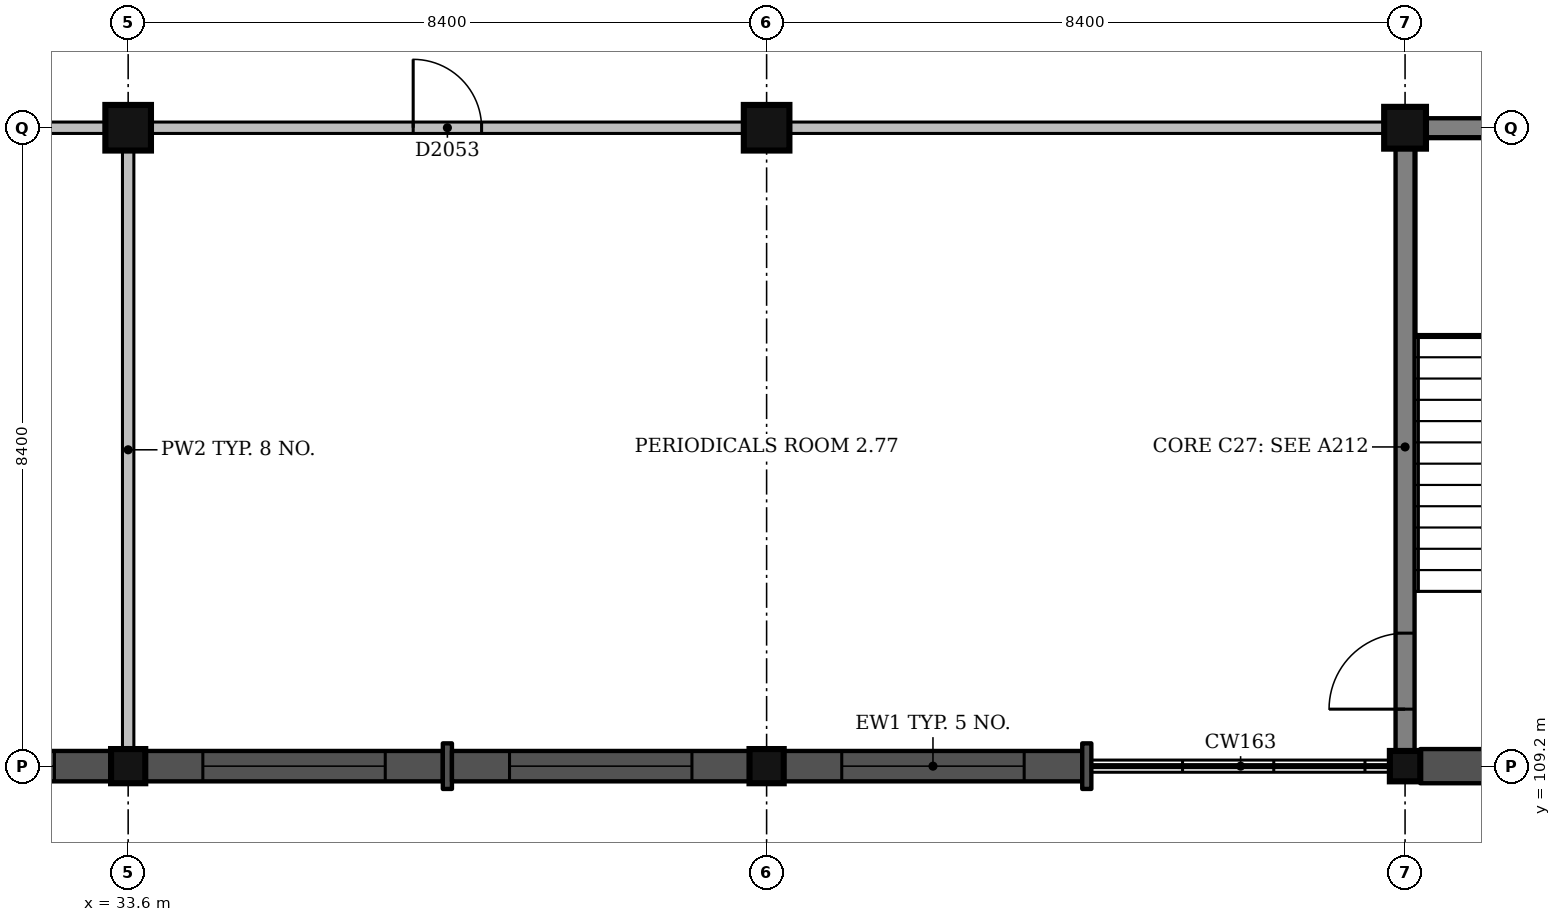
"""IFC4 building model, lengths in metres.
Left out: names, types, materials, properties, quantities, classifications, styles, units other than length and angle.
Written with IfcOpenShell. Run it as: python <this file> out.ifc"""

import sys

from ifc_helpers import new_model, si_unit, direction, frame, frame_2d, origin, origin_2d, place, context, subcontext, project, spatial, rectangle, extrude, element, fill, save


model = new_model("IFC4")
c1 = context("Model", 3, precision=1e-05, world=origin(), true_north=direction((0.0, 1.0)))
c2 = subcontext(c1, "Body", "Model", "MODEL_VIEW")
j1 = project(units=[si_unit("LENGTHUNIT", "METRE"), si_unit("PLANEANGLEUNIT", "RADIAN")], contexts=[c1])
p1 = place(None, origin())
s1 = spatial("IfcSite", under=j1, at=p1, CompositionType="ELEMENT")
p2 = place(p1, origin())
s2 = spatial("IfcBuilding", under=s1, at=p2, CompositionType="ELEMENT")
p3 = place(p2, frame((0.0, 0.0, 9.0)))
s3 = spatial("IfcBuildingStorey", under=s2, at=p3, CompositionType="ELEMENT", Elevation=9.0)
p4 = place(p3, frame((33.6, 109.2, -0.25), z_axis=(0.0, 0.0, 1.0), x_axis=(1.0, 0.0, 0.0)))
e1 = element("IfcColumn", 1, at=p4, inside=s3, PredefinedType="COLUMN", context=c2, shape_type="SweptSolid", body=[
    extrude(rectangle(XDim=0.45, YDim=0.45, at=origin_2d()), origin(), (0.0, 0.0, 1.0), 4.75),
])
p5 = place(p3, frame((33.6, 117.6, -1.5), z_axis=(0.0, 0.0, 1.0), x_axis=(1.0, 0.0, 0.0)))
e2 = element("IfcColumn", 2, at=p5, inside=s3, PredefinedType="COLUMN", context=c2, shape_type="SweptSolid", body=[
    extrude(rectangle(XDim=0.6, YDim=0.6, at=origin_2d()), origin(), (0.0, 0.0, 1.0), 6.0),
])
p6 = place(p3, frame((42.0, 109.2, -0.25), z_axis=(0.0, 0.0, 1.0), x_axis=(1.0, 0.0, 0.0)))
e3 = element("IfcColumn", 3, at=p6, inside=s3, PredefinedType="COLUMN", context=c2, shape_type="SweptSolid", body=[
    extrude(rectangle(XDim=0.45, YDim=0.45, at=origin_2d()), origin(), (0.0, 0.0, 1.0), 4.75),
])
p7 = place(p3, frame((42.0, 117.6, -1.5), z_axis=(0.0, 0.0, 1.0), x_axis=(1.0, 0.0, 0.0)))
e4 = element("IfcColumn", 4, at=p7, inside=s3, PredefinedType="COLUMN", context=c2, shape_type="SweptSolid", body=[
    extrude(rectangle(XDim=0.6, YDim=0.6, at=origin_2d()), origin(), (0.0, 0.0, 1.0), 6.0),
])
p8 = place(p3, frame((50.4, 109.2, -0.25), z_axis=(0.0, 0.0, 1.0), x_axis=(1.0, 0.0, 0.0)))
e5 = element("IfcColumn", 5, at=p8, inside=s3, PredefinedType="COLUMN", context=c2, shape_type="SweptSolid", body=[
    extrude(rectangle(XDim=0.4, YDim=0.4, at=origin_2d()), origin(), (0.0, 0.0, 1.0), 4.75),
])
p9 = place(p3, frame((50.4, 117.6, -1.5), z_axis=(0.0, 0.0, 1.0), x_axis=(1.0, 0.0, 0.0)))
e6 = element("IfcColumn", 6, at=p9, inside=s3, PredefinedType="COLUMN", context=c2, shape_type="SweptSolid", body=[
    extrude(rectangle(XDim=0.55, YDim=0.55, at=origin_2d()), origin(), (0.0, 0.0, 1.0), 6.0),
])
p10 = place(p3, frame((50.675, 117.6, 0.0), z_axis=(0.0, 0.0, 1.0), x_axis=(1.0, 0.0, 0.0)))
e7 = element("IfcWall", 7, at=p10, inside=s3, PredefinedType="SHEAR", context=c2, shape_type="SweptSolid", body=[
    extrude(rectangle(XDim=5.45, YDim=0.25, at=frame_2d((2.725, 0.0))), origin(), (0.0, 0.0, 1.0), 4.5),
])
p11 = place(p3, frame((50.4, 109.4, 0.0), z_axis=(0.0, 0.0, 1.0), x_axis=(0.0, 1.0, 0.0)))
e8 = element("IfcWall", 8, at=p11, inside=s3, PredefinedType="SHEAR", context=c2, shape_type="SweptSolid", body=[
    extrude(rectangle(XDim=7.925, YDim=0.25, at=frame_2d((3.962, 0.0))), origin(), (0.0, 0.0, 1.0), 4.5),
])
p12 = place(p11, frame((0.55, 0.0, 0.0)))
e9 = element("IfcOpeningElement", 9, at=p12, cuts=e8, PredefinedType="OPENING", context=c2, shape_type="SweptSolid", body=[
    extrude(rectangle(XDim=1.0, YDim=2.1, at=frame_2d((0.5, 1.05))), frame((0.0, 0.135, 0.0), z_axis=(0.0, -1.0, 0.0), x_axis=(1.0, 0.0, 0.0)), (0.0, 0.0, 1.0), 0.27),
])
p13 = place(p3, frame((29.485, 109.2, 0.0), z_axis=(0.0, 0.0, 1.0), x_axis=(1.0, 0.0, 0.0)))
e10 = element("IfcWall", 10, at=p13, inside=s3, PredefinedType="SOLIDWALL", context=c2, shape_type="SweptSolid", body=[
    extrude(rectangle(XDim=3.89, YDim=0.4, at=frame_2d((1.945, 0.0))), origin(), (0.0, 0.0, 1.0), 4.2),
])
p14 = place(p13, frame((0.745, 0.0, 0.6)))
e11 = element("IfcOpeningElement", 11, at=p14, cuts=e10, PredefinedType="OPENING", context=c2, shape_type="SweptSolid", body=[
    extrude(rectangle(XDim=2.4, YDim=2.4, at=frame_2d((1.2, 1.2))), frame((0.0, 0.21, 0.0), z_axis=(0.0, -1.0, 0.0), x_axis=(1.0, 0.0, 0.0)), (0.0, 0.0, 1.0), 0.42),
])
p15 = place(p3, frame((33.825, 109.2, 0.0), z_axis=(0.0, 0.0, 1.0), x_axis=(1.0, 0.0, 0.0)))
e12 = element("IfcWall", 12, at=p15, inside=s3, PredefinedType="SOLIDWALL", context=c2, shape_type="SweptSolid", body=[
    extrude(rectangle(XDim=3.915, YDim=0.4, at=frame_2d((1.958, 0.0))), origin(), (0.0, 0.0, 1.0), 3.35),
])
p16 = place(p15, frame((0.758, 0.0, 0.6)))
e13 = element("IfcOpeningElement", 13, at=p16, cuts=e12, PredefinedType="OPENING", context=c2, shape_type="SweptSolid", body=[
    extrude(rectangle(XDim=2.4, YDim=2.4, at=frame_2d((1.2, 1.2))), frame((0.0, 0.21, 0.0), z_axis=(0.0, -1.0, 0.0), x_axis=(1.0, 0.0, 0.0)), (0.0, 0.0, 1.0), 0.42),
])
p17 = place(p3, frame((37.74, 109.2, 0.0), z_axis=(0.0, 0.0, 1.0), x_axis=(1.0, 0.0, 0.0)))
e14 = element("IfcWall", 14, at=p17, inside=s3, PredefinedType="SOLIDWALL", context=c2, shape_type="SweptSolid", body=[
    extrude(rectangle(XDim=0.12, YDim=0.6, at=frame_2d((0.06, 0.0))), origin(), (0.0, 0.0, 1.0), 3.35),
])
p18 = place(p3, frame((37.86, 109.2, 0.0), z_axis=(0.0, 0.0, 1.0), x_axis=(1.0, 0.0, 0.0)))
e15 = element("IfcWall", 15, at=p18, inside=s3, PredefinedType="SOLIDWALL", context=c2, shape_type="SweptSolid", body=[
    extrude(rectangle(XDim=3.915, YDim=0.4, at=frame_2d((1.958, 0.0))), origin(), (0.0, 0.0, 1.0), 3.35),
])
p19 = place(p18, frame((0.758, 0.0, 0.6)))
e16 = element("IfcOpeningElement", 16, at=p19, cuts=e15, PredefinedType="OPENING", context=c2, shape_type="SweptSolid", body=[
    extrude(rectangle(XDim=2.4, YDim=2.4, at=frame_2d((1.2, 1.2))), frame((0.0, 0.21, 0.0), z_axis=(0.0, -1.0, 0.0), x_axis=(1.0, 0.0, 0.0)), (0.0, 0.0, 1.0), 0.42),
])
p20 = place(p3, frame((42.225, 109.2, 0.0), z_axis=(0.0, 0.0, 1.0), x_axis=(1.0, 0.0, 0.0)))
e17 = element("IfcWall", 17, at=p20, inside=s3, PredefinedType="SOLIDWALL", context=c2, shape_type="SweptSolid", body=[
    extrude(rectangle(XDim=3.927, YDim=0.4, at=frame_2d((1.964, 0.0))), origin(), (0.0, 0.0, 1.0), 3.35),
])
p21 = place(p20, frame((0.764, 0.0, 0.6)))
e18 = element("IfcOpeningElement", 18, at=p21, cuts=e17, PredefinedType="OPENING", context=c2, shape_type="SweptSolid", body=[
    extrude(rectangle(XDim=2.4, YDim=2.4, at=frame_2d((1.2, 1.2))), frame((0.0, 0.21, 0.0), z_axis=(0.0, -1.0, 0.0), x_axis=(1.0, 0.0, 0.0)), (0.0, 0.0, 1.0), 0.42),
])
p22 = place(p3, frame((46.153, 109.2, 0.0), z_axis=(0.0, 0.0, 1.0), x_axis=(1.0, 0.0, 0.0)))
e19 = element("IfcWall", 19, at=p22, inside=s3, PredefinedType="SOLIDWALL", context=c2, shape_type="SweptSolid", body=[
    extrude(rectangle(XDim=0.12, YDim=0.6, at=frame_2d((0.06, 0.0))), origin(), (0.0, 0.0, 1.0), 3.35),
])
p23 = place(p3, frame((50.6, 109.2, 0.0), z_axis=(0.0, 0.0, 1.0), x_axis=(1.0, 0.0, 0.0)))
e20 = element("IfcWall", 20, at=p23, inside=s3, PredefinedType="SOLIDWALL", context=c2, shape_type="SweptSolid", body=[
    extrude(rectangle(XDim=3.94, YDim=0.45, at=frame_2d((1.97, 0.0))), origin(), (0.0, 0.0, 1.0), 3.35),
])
p24 = place(p3, frame((25.5, 117.6, 0.0), z_axis=(0.0, 0.0, 1.0), x_axis=(1.0, 0.0, 0.0)))
e21 = element("IfcWall", 21, at=p24, inside=s3, PredefinedType="PARTITIONING", context=c2, shape_type="SweptSolid", body=[
    extrude(rectangle(XDim=7.8, YDim=0.15, at=frame_2d((3.9, 0.0))), origin(), (0.0, 0.0, 1.0), 3.4),
])
p25 = place(p3, frame((33.9, 117.6, 0.0), z_axis=(0.0, 0.0, 1.0), x_axis=(1.0, 0.0, 0.0)))
e22 = element("IfcWall", 22, at=p25, inside=s3, PredefinedType="PARTITIONING", context=c2, shape_type="SweptSolid", body=[
    extrude(rectangle(XDim=7.8, YDim=0.15, at=frame_2d((3.9, 0.0))), origin(), (0.0, 0.0, 1.0), 3.4),
])
p26 = place(p25, frame((3.45, 0.0, 0.0)))
e23 = element("IfcOpeningElement", 23, at=p26, cuts=e22, PredefinedType="OPENING", context=c2, shape_type="SweptSolid", body=[
    extrude(rectangle(XDim=0.9, YDim=2.1, at=frame_2d((0.45, 1.05))), frame((0.0, 0.085, 0.0), z_axis=(0.0, -1.0, 0.0), x_axis=(1.0, 0.0, 0.0)), (0.0, 0.0, 1.0), 0.17),
])
p27 = place(p3, frame((42.3, 117.6, 0.0), z_axis=(0.0, 0.0, 1.0), x_axis=(1.0, 0.0, 0.0)))
e24 = element("IfcWall", 24, at=p27, inside=s3, PredefinedType="PARTITIONING", context=c2, shape_type="SweptSolid", body=[
    extrude(rectangle(XDim=7.825, YDim=0.15, at=frame_2d((3.913, 0.0))), origin(), (0.0, 0.0, 1.0), 3.4),
])
p28 = place(p3, frame((33.6, 109.425, 0.0), z_axis=(0.0, 0.0, 1.0), x_axis=(0.0, 1.0, 0.0)))
e25 = element("IfcWall", 25, at=p28, inside=s3, PredefinedType="PARTITIONING", context=c2, shape_type="SweptSolid", body=[
    extrude(rectangle(XDim=7.875, YDim=0.15, at=frame_2d((3.938, 0.0))), origin(), (0.0, 0.0, 1.0), 3.4),
])
p29 = place(p14, origin())
e26 = element("IfcWindow", 26, at=p29, inside=s3, PartitioningType="SINGLE_PANEL", PredefinedType="WINDOW", context=c2, shape_type="SweptSolid", body=[
    extrude(rectangle(XDim=2.4, YDim=2.4, at=frame_2d((1.2, 1.2))), frame((0.0, 0.16, 0.0), z_axis=(0.0, -1.0, 0.0), x_axis=(1.0, 0.0, 0.0)), (0.0, 0.0, 1.0), 0.06),
])
fill(e11, e26)
p30 = place(p16, origin())
e27 = element("IfcWindow", 27, at=p30, inside=s3, PartitioningType="SINGLE_PANEL", PredefinedType="WINDOW", context=c2, shape_type="SweptSolid", body=[
    extrude(rectangle(XDim=2.4, YDim=2.4, at=frame_2d((1.2, 1.2))), frame((0.0, 0.16, 0.0), z_axis=(0.0, -1.0, 0.0), x_axis=(1.0, 0.0, 0.0)), (0.0, 0.0, 1.0), 0.06),
])
fill(e13, e27)
p31 = place(p19, origin())
e28 = element("IfcWindow", 28, at=p31, inside=s3, PartitioningType="SINGLE_PANEL", PredefinedType="WINDOW", context=c2, shape_type="SweptSolid", body=[
    extrude(rectangle(XDim=2.4, YDim=2.4, at=frame_2d((1.2, 1.2))), frame((0.0, 0.16, 0.0), z_axis=(0.0, -1.0, 0.0), x_axis=(1.0, 0.0, 0.0)), (0.0, 0.0, 1.0), 0.06),
])
fill(e16, e28)
p32 = place(p21, origin())
e29 = element("IfcWindow", 29, at=p32, inside=s3, PartitioningType="SINGLE_PANEL", PredefinedType="WINDOW", context=c2, shape_type="SweptSolid", body=[
    extrude(rectangle(XDim=2.4, YDim=2.4, at=frame_2d((1.2, 1.2))), frame((0.0, 0.16, 0.0), z_axis=(0.0, -1.0, 0.0), x_axis=(1.0, 0.0, 0.0)), (0.0, 0.0, 1.0), 0.06),
])
fill(e18, e29)
p33 = place(p26, origin())
e30 = element("IfcDoor", 30, at=p33, inside=s3, OperationType="SINGLE_SWING_LEFT", PredefinedType="DOOR", context=c2, shape_type="SweptSolid", body=[
    extrude(rectangle(XDim=0.9, YDim=2.1, at=frame_2d((0.45, 1.05))), frame((0.0, 0.025, 0.0), z_axis=(0.0, -1.0, 0.0), x_axis=(1.0, 0.0, 0.0)), (0.0, 0.0, 1.0), 0.05),
])
fill(e23, e30)
p34 = place(p12, origin())
e31 = element("IfcDoor", 31, at=p34, inside=s3, OperationType="SINGLE_SWING_LEFT", PredefinedType="DOOR", context=c2, shape_type="SweptSolid", body=[
    extrude(rectangle(XDim=1.0, YDim=2.1, at=frame_2d((0.5, 1.05))), frame((0.0, 0.025, 0.0), z_axis=(0.0, -1.0, 0.0), x_axis=(1.0, 0.0, 0.0)), (0.0, 0.0, 1.0), 0.05),
])
fill(e9, e31)
save(model, sys.argv[1])
